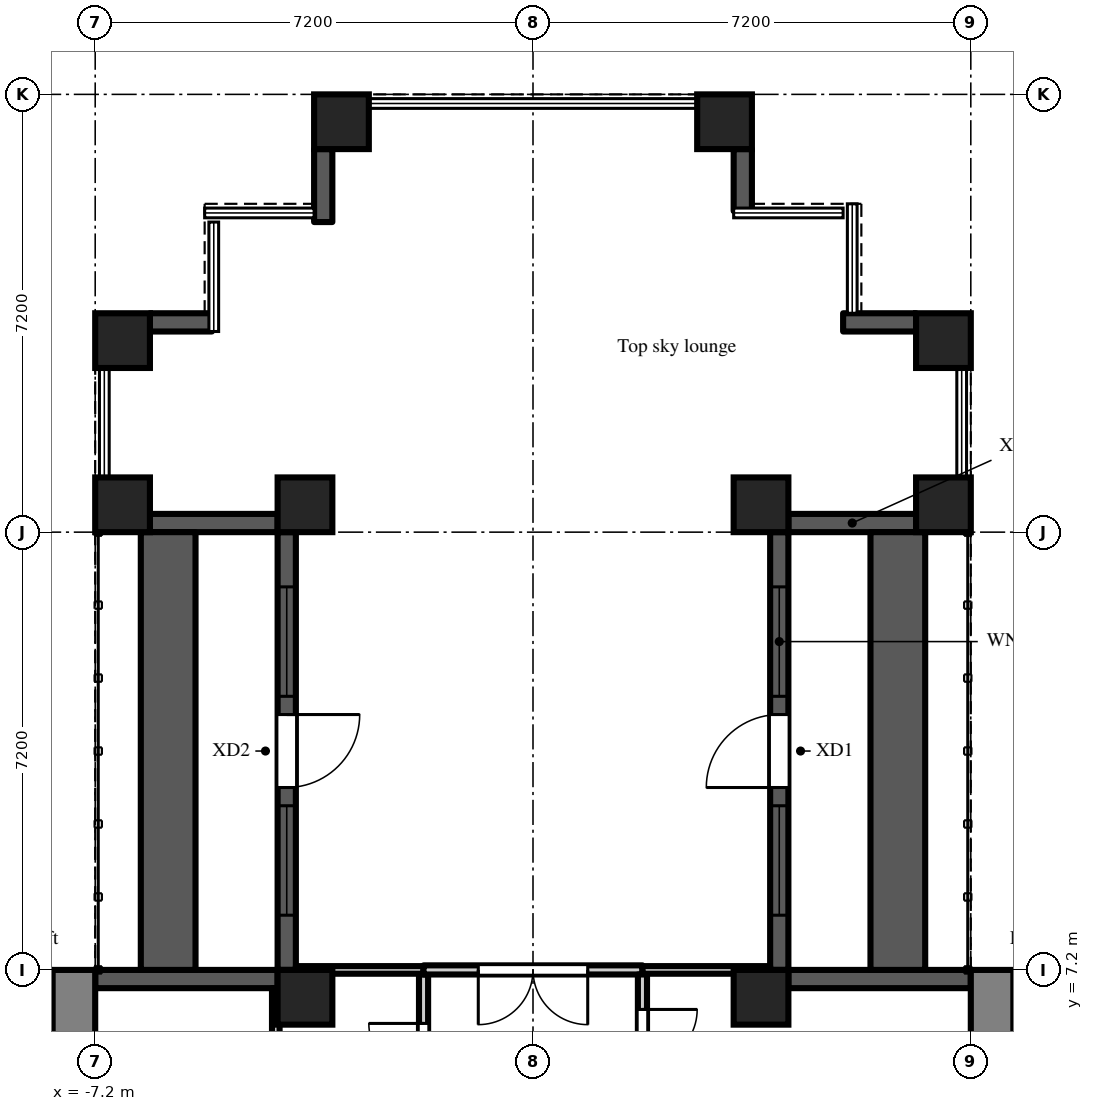
"""IFC4 building model, lengths in metres.
Left out: names, types, materials, properties, quantities, classifications, styles, units other than length and angle.
Written with IfcOpenShell. Run it as: python <this file> out.ifc"""

import sys

from ifc_helpers import new_model, si_unit, direction, frame, frame_2d, origin, origin_2d, place, context, subcontext, project, spatial, rectangle, extrude, element, fill, save


model = new_model("IFC4")
c1 = context("Model", 3, precision=1e-05, world=origin(), true_north=direction((0.0, 1.0)))
c2 = subcontext(c1, "Body", "Model", "MODEL_VIEW")
j1 = project(units=[si_unit("LENGTHUNIT", "METRE"), si_unit("PLANEANGLEUNIT", "RADIAN")], contexts=[c1])
p1 = place(None, origin())
s1 = spatial("IfcSite", under=j1, at=p1, CompositionType="ELEMENT")
p2 = place(p1, origin())
s2 = spatial("IfcBuilding", under=s1, at=p2, CompositionType="ELEMENT")
p3 = place(p2, frame((0.0, 0.0, 237.9)))
s3 = spatial("IfcBuildingStorey", under=s2, at=p3, CompositionType="ELEMENT", Elevation=237.9)
for number, where, z_axis, x_axis in (
    (1, (-6.75, 14.85, 0.0), (0.0, 0.0, 1.0), (1.0, 0.0, 0.0)),
    (2, (-6.75, 17.55, 0.0), (0.0, 0.0, 1.0), (1.0, 0.0, 0.0)),
    (3, (-3.75, 6.75, 0.0), (0.0, 0.0, 1.0), (1.0, 0.0, 0.0)),
    (4, (-3.75, 14.85, 0.0), (0.0, 0.0, 1.0), (1.0, 0.0, 0.0)),
    (5, (-3.15, 21.15, 0.0), (0.0, 0.0, 1.0), (1.0, 0.0, 0.0)),
    (6, (3.15, 21.15, 0.0), (0.0, 0.0, 1.0), (1.0, 0.0, 0.0)),
    (7, (3.75, 6.75, 0.0), (0.0, 0.0, 1.0), (1.0, 0.0, 0.0)),
    (8, (3.75, 14.85, 0.0), (0.0, 0.0, 1.0), (1.0, 0.0, 0.0)),
    (9, (6.75, 14.85, 0.0), (0.0, 0.0, 1.0), (1.0, 0.0, 0.0)),
    (10, (6.75, 17.55, 0.0), (0.0, 0.0, 1.0), (1.0, 0.0, 0.0)),
):
    element("IfcColumn", number, at=place(p3, frame(where, z_axis=z_axis, x_axis=x_axis)), inside=s3, PredefinedType="COLUMN", context=c2, shape_type="SweptSolid", body=[
        extrude(rectangle(XDim=0.9, YDim=0.9, at=origin_2d()), origin(), (0.0, 0.0, 1.0), 4.2),
    ])
p4 = place(p3, frame((7.2, 7.05, 0.0), z_axis=(0.0, 0.0, 1.0), x_axis=(-1.0, 0.0, 0.0)))
e11 = element("IfcWall", 11, at=p4, inside=s3, PredefinedType="SOLIDWALL", context=c2, shape_type="SweptSolid", body=[
    extrude(rectangle(XDim=3.0, YDim=0.3, at=frame_2d((1.5, 0.0))), origin(), (0.0, 0.0, 1.0), 3.75),
])
p5 = place(p3, frame((4.05, 7.2, 0.0), z_axis=(0.0, 0.0, 1.0), x_axis=(0.0, 1.0, 0.0)))
e12 = element("IfcWall", 12, at=p5, inside=s3, PredefinedType="SOLIDWALL", context=c2, shape_type="SweptSolid", body=[
    extrude(rectangle(XDim=7.2, YDim=0.3, at=frame_2d((3.6, 0.0))), origin(), (0.0, 0.0, 1.0), 3.75),
])
p6 = place(p5, frame((3.0, 0.0, 0.0)))
e13 = element("IfcOpeningElement", 13, at=p6, cuts=e12, PredefinedType="OPENING", context=c2, shape_type="SweptSolid", body=[
    extrude(rectangle(XDim=1.2, YDim=2.05, at=frame_2d((0.6, 1.025))), frame((0.0, 0.16, 0.0), z_axis=(0.0, -1.0, 0.0), x_axis=(1.0, 0.0, 0.0)), (0.0, 0.0, 1.0), 0.32),
])
p7 = place(p5, frame((0.9, 0.0, 0.2)))
e14 = element("IfcOpeningElement", 14, at=p7, cuts=e12, PredefinedType="OPENING", context=c2, shape_type="SweptSolid", body=[
    extrude(rectangle(XDim=1.8, YDim=1.85, at=frame_2d((0.9, 0.925))), frame((0.0, 0.16, 0.0), z_axis=(0.0, -1.0, 0.0), x_axis=(1.0, 0.0, 0.0)), (0.0, 0.0, 1.0), 0.32),
])
p8 = place(p5, frame((4.5, 0.0, 0.2)))
e15 = element("IfcOpeningElement", 15, at=p8, cuts=e12, PredefinedType="OPENING", context=c2, shape_type="SweptSolid", body=[
    extrude(rectangle(XDim=1.8, YDim=1.85, at=frame_2d((0.9, 0.925))), frame((0.0, 0.16, 0.0), z_axis=(0.0, -1.0, 0.0), x_axis=(1.0, 0.0, 0.0)), (0.0, 0.0, 1.0), 0.32),
])
p9 = place(p3, frame((4.2, 14.55, 0.0), z_axis=(0.0, 0.0, 1.0), x_axis=(1.0, 0.0, 0.0)))
e16 = element("IfcWall", 16, at=p9, inside=s3, PredefinedType="SOLIDWALL", context=c2, shape_type="SweptSolid", body=[
    extrude(rectangle(XDim=2.1, YDim=0.3, at=frame_2d((1.05, 0.0))), origin(), (0.0, 0.0, 1.0), 3.75),
])
p10 = place(p3, frame((6.3, 17.85, 0.0), z_axis=(0.0, 0.0, 1.0), x_axis=(-1.0, 0.0, 0.0)))
e17 = element("IfcWall", 17, at=p10, inside=s3, PredefinedType="SOLIDWALL", context=c2, shape_type="SweptSolid", body=[
    extrude(rectangle(XDim=1.2, YDim=0.3, at=frame_2d((0.6, 0.0))), origin(), (0.0, 0.0, 1.0), 3.75),
])
p11 = place(p3, frame((3.45, 19.68, 0.0), z_axis=(0.0, 0.0, 1.0), x_axis=(0.0, 1.0, 0.0)))
e18 = element("IfcWall", 18, at=p11, inside=s3, PredefinedType="SOLIDWALL", context=c2, shape_type="SweptSolid", body=[
    extrude(rectangle(XDim=1.02, YDim=0.3, at=frame_2d((0.51, 0.0))), origin(), (0.0, 0.0, 1.0), 3.75),
])
p12 = place(p3, frame((-3.45, 20.7, 0.0), z_axis=(0.0, 0.0, 1.0), x_axis=(0.0, -1.0, 0.0)))
e19 = element("IfcWall", 19, at=p12, inside=s3, PredefinedType="SOLIDWALL", context=c2, shape_type="SweptSolid", body=[
    extrude(rectangle(XDim=1.2, YDim=0.3, at=frame_2d((0.6, 0.0))), origin(), (0.0, 0.0, 1.0), 3.75),
])
p13 = place(p3, frame((-5.28, 17.85, 0.0), z_axis=(0.0, 0.0, 1.0), x_axis=(-1.0, 0.0, 0.0)))
e20 = element("IfcWall", 20, at=p13, inside=s3, PredefinedType="SOLIDWALL", context=c2, shape_type="SweptSolid", body=[
    extrude(rectangle(XDim=1.02, YDim=0.3, at=frame_2d((0.51, 0.0))), origin(), (0.0, 0.0, 1.0), 3.75),
])
p14 = place(p3, frame((-6.3, 14.55, 0.0), z_axis=(0.0, 0.0, 1.0), x_axis=(1.0, 0.0, 0.0)))
e21 = element("IfcWall", 21, at=p14, inside=s3, PredefinedType="SOLIDWALL", context=c2, shape_type="SweptSolid", body=[
    extrude(rectangle(XDim=2.1, YDim=0.3, at=frame_2d((1.05, 0.0))), origin(), (0.0, 0.0, 1.0), 3.75),
])
p15 = place(p3, frame((-4.05, 14.4, 0.0), z_axis=(0.0, 0.0, 1.0), x_axis=(0.0, -1.0, 0.0)))
e22 = element("IfcWall", 22, at=p15, inside=s3, PredefinedType="SOLIDWALL", context=c2, shape_type="SweptSolid", body=[
    extrude(rectangle(XDim=7.2, YDim=0.3, at=frame_2d((3.6, 0.0))), origin(), (0.0, 0.0, 1.0), 3.75),
])
p16 = place(p15, frame((3.0, 0.0, 0.0)))
e23 = element("IfcOpeningElement", 23, at=p16, cuts=e22, PredefinedType="OPENING", context=c2, shape_type="SweptSolid", body=[
    extrude(rectangle(XDim=1.2, YDim=2.05, at=frame_2d((0.6, 1.025))), frame((0.0, 0.16, 0.0), z_axis=(0.0, -1.0, 0.0), x_axis=(1.0, 0.0, 0.0)), (0.0, 0.0, 1.0), 0.32),
])
p17 = place(p15, frame((0.9, 0.0, 0.2)))
e24 = element("IfcOpeningElement", 24, at=p17, cuts=e22, PredefinedType="OPENING", context=c2, shape_type="SweptSolid", body=[
    extrude(rectangle(XDim=1.8, YDim=1.85, at=frame_2d((0.9, 0.925))), frame((0.0, 0.16, 0.0), z_axis=(0.0, -1.0, 0.0), x_axis=(1.0, 0.0, 0.0)), (0.0, 0.0, 1.0), 0.32),
])
p18 = place(p15, frame((4.5, 0.0, 0.2)))
e25 = element("IfcOpeningElement", 25, at=p18, cuts=e22, PredefinedType="OPENING", context=c2, shape_type="SweptSolid", body=[
    extrude(rectangle(XDim=1.8, YDim=1.85, at=frame_2d((0.9, 0.925))), frame((0.0, 0.16, 0.0), z_axis=(0.0, -1.0, 0.0), x_axis=(1.0, 0.0, 0.0)), (0.0, 0.0, 1.0), 0.32),
])
p19 = place(p3, frame((-4.2, 7.05, 0.0), z_axis=(0.0, 0.0, 1.0), x_axis=(-1.0, 0.0, 0.0)))
e26 = element("IfcWall", 26, at=p19, inside=s3, PredefinedType="SOLIDWALL", context=c2, shape_type="SweptSolid", body=[
    extrude(rectangle(XDim=3.0, YDim=0.3, at=frame_2d((1.5, 0.0))), origin(), (0.0, 0.0, 1.0), 3.75),
])
for number, where, z_axis, x_axis in (
    (27, (6.0, 7.2, 0.0), (0.0, 0.0, 1.0), (0.0, 1.0, 0.0)),
    (28, (-6.0, 7.2, 0.0), (0.0, 0.0, 1.0), (0.0, 1.0, 0.0)),
):
    element("IfcWall", number, at=place(p3, frame(where, z_axis=z_axis, x_axis=x_axis)), inside=s3, PredefinedType="PARAPET", context=c2, shape_type="SweptSolid", body=[
        extrude(rectangle(XDim=7.2, YDim=0.9, at=frame_2d((3.6, 0.0))), origin(), (0.0, 0.0, 1.0), 0.8),
    ])
p20 = place(p3, frame((7.55, -7.2, 0.0), z_axis=(0.0, 0.0, 1.0), x_axis=(0.0, 1.0, 0.0)))
e29 = element("IfcWall", 29, at=p20, inside=s3, PredefinedType="SHEAR", context=c2, shape_type="SweptSolid", body=[
    extrude(rectangle(XDim=14.4, YDim=0.7, at=frame_2d((7.2, 0.0))), origin(), (0.0, 0.0, 1.0), 3.75),
])
p21 = place(p20, frame((6.0, 0.0, 0.0)))
e30 = element("IfcOpeningElement", 30, at=p21, cuts=e29, PredefinedType="OPENING", context=c2, shape_type="SweptSolid", body=[
    extrude(rectangle(XDim=2.4, YDim=2.2, at=frame_2d((1.2, 1.1))), frame((0.0, 0.36, 0.0), z_axis=(0.0, -1.0, 0.0), x_axis=(1.0, 0.0, 0.0)), (0.0, 0.0, 1.0), 0.72),
])
p22 = place(p3, frame((-7.55, -7.2, 0.0), z_axis=(0.0, 0.0, 1.0), x_axis=(0.0, 1.0, 0.0)))
e31 = element("IfcWall", 31, at=p22, inside=s3, PredefinedType="SHEAR", context=c2, shape_type="SweptSolid", body=[
    extrude(rectangle(XDim=14.4, YDim=0.7, at=frame_2d((7.2, 0.0))), origin(), (0.0, 0.0, 1.0), 3.75),
])
p23 = place(p22, frame((6.0, 0.0, 0.0)))
e32 = element("IfcOpeningElement", 32, at=p23, cuts=e31, PredefinedType="OPENING", context=c2, shape_type="SweptSolid", body=[
    extrude(rectangle(XDim=2.4, YDim=2.2, at=frame_2d((1.2, 1.1))), frame((0.0, 0.36, 0.0), z_axis=(0.0, -1.0, 0.0), x_axis=(1.0, 0.0, 0.0)), (0.0, 0.0, 1.0), 0.72),
])
p24 = place(p3, frame((-4.23, 1.875, 0.0), z_axis=(0.0, 0.0, 1.0), x_axis=(0.0, 1.0, 0.0)))
e33 = element("IfcWall", 33, at=p24, inside=s3, PredefinedType="PARTITIONING", context=c2, shape_type="SweptSolid", body=[
    extrude(rectangle(XDim=5.025, YDim=0.125, at=frame_2d((2.512, 0.0))), origin(), (0.0, 0.0, 1.0), 3.75),
])
p25 = place(p3, frame((-3.9, 7.2, 0.0), z_axis=(0.0, 0.0, 1.0), x_axis=(1.0, 0.0, 0.0)))
e34 = element("IfcWall", 34, at=p25, inside=s3, PredefinedType="PARTITIONING", context=c2, shape_type="SweptSolid", body=[
    extrude(rectangle(XDim=2.1, YDim=0.125, at=frame_2d((1.05, 0.0))), origin(), (0.0, 0.0, 1.0), 3.75),
])
p26 = place(p3, frame((-1.8, 1.725, 0.0), z_axis=(0.0, 0.0, 1.0), x_axis=(0.0, 1.0, 0.0)))
e35 = element("IfcWall", 35, at=p26, inside=s3, PredefinedType="PARTITIONING", context=c2, shape_type="SweptSolid", body=[
    extrude(rectangle(XDim=5.4, YDim=0.15, at=frame_2d((2.7, 0.0))), origin(), (0.0, 0.0, 1.0), 3.75),
])
p27 = place(p26, frame((1.11, 0.0, 0.0)))
e36 = element("IfcOpeningElement", 36, at=p27, cuts=e35, PredefinedType="OPENING", context=c2, shape_type="SweptSolid", body=[
    extrude(rectangle(XDim=0.9, YDim=2.1, at=frame_2d((0.45, 1.05))), frame((0.0, 0.085, 0.0), z_axis=(0.0, -1.0, 0.0), x_axis=(1.0, 0.0, 0.0)), (0.0, 0.0, 1.0), 0.17),
])
p28 = place(p26, frame((3.695, 0.0, 0.0)))
e37 = element("IfcOpeningElement", 37, at=p28, cuts=e35, PredefinedType="OPENING", context=c2, shape_type="SweptSolid", body=[
    extrude(rectangle(XDim=0.9, YDim=2.1, at=frame_2d((0.45, 1.05))), frame((0.0, 0.085, 0.0), z_axis=(0.0, -1.0, 0.0), x_axis=(1.0, 0.0, 0.0)), (0.0, 0.0, 1.0), 0.17),
])
p29 = place(p3, frame((-1.8, 7.2, 0.0), z_axis=(0.0, 0.0, 1.0), x_axis=(1.0, 0.0, 0.0)))
e38 = element("IfcWall", 38, at=p29, inside=s3, PredefinedType="PARTITIONING", context=c2, shape_type="SweptSolid", body=[
    extrude(rectangle(XDim=3.6, YDim=0.15, at=frame_2d((1.8, 0.0))), origin(), (0.0, 0.0, 1.0), 3.75),
])
p30 = place(p29, frame((0.9, 0.0, 0.0)))
e39 = element("IfcOpeningElement", 39, at=p30, cuts=e38, PredefinedType="OPENING", context=c2, shape_type="SweptSolid", body=[
    extrude(rectangle(XDim=1.8, YDim=2.1, at=frame_2d((0.9, 1.05))), frame((0.0, 0.085, 0.0), z_axis=(0.0, -1.0, 0.0), x_axis=(1.0, 0.0, 0.0)), (0.0, 0.0, 1.0), 0.17),
])
p31 = place(p3, frame((1.8, 1.725, 0.0), z_axis=(0.0, 0.0, 1.0), x_axis=(0.0, 1.0, 0.0)))
e40 = element("IfcWall", 40, at=p31, inside=s3, PredefinedType="PARTITIONING", context=c2, shape_type="SweptSolid", body=[
    extrude(rectangle(XDim=5.4, YDim=0.15, at=frame_2d((2.7, 0.0))), origin(), (0.0, 0.0, 1.0), 3.75),
])
p32 = place(p31, frame((0.175, 0.0, 0.0)))
e41 = element("IfcOpeningElement", 41, at=p32, cuts=e40, PredefinedType="OPENING", context=c2, shape_type="SweptSolid", body=[
    extrude(rectangle(XDim=0.9, YDim=2.1, at=frame_2d((0.45, 1.05))), frame((0.0, 0.085, 0.0), z_axis=(0.0, -1.0, 0.0), x_axis=(1.0, 0.0, 0.0)), (0.0, 0.0, 1.0), 0.17),
])
p33 = place(p31, frame((3.925, 0.0, 0.0)))
e42 = element("IfcOpeningElement", 42, at=p33, cuts=e40, PredefinedType="OPENING", context=c2, shape_type="SweptSolid", body=[
    extrude(rectangle(XDim=0.9, YDim=2.1, at=frame_2d((0.45, 1.05))), frame((0.0, 0.085, 0.0), z_axis=(0.0, -1.0, 0.0), x_axis=(1.0, 0.0, 0.0)), (0.0, 0.0, 1.0), 0.17),
])
p34 = place(p3, frame((1.8, 7.2, 0.0), z_axis=(0.0, 0.0, 1.0), x_axis=(1.0, 0.0, 0.0)))
e43 = element("IfcWall", 43, at=p34, inside=s3, PredefinedType="PARTITIONING", context=c2, shape_type="SweptSolid", body=[
    extrude(rectangle(XDim=2.1, YDim=0.125, at=frame_2d((1.05, 0.0))), origin(), (0.0, 0.0, 1.0), 3.75),
])
p35 = place(p6, origin())
e44 = element("IfcDoor", 44, at=p35, inside=s3, OperationType="SINGLE_SWING_LEFT", PredefinedType="DOOR", context=c2, shape_type="SweptSolid", body=[
    extrude(rectangle(XDim=1.2, YDim=2.05, at=frame_2d((0.6, 1.025))), frame((0.0, 0.025, 0.0), z_axis=(0.0, -1.0, 0.0), x_axis=(1.0, 0.0, 0.0)), (0.0, 0.0, 1.0), 0.05),
])
fill(e13, e44)
p36 = place(p7, origin())
e45 = element("IfcWindow", 45, at=p36, inside=s3, PartitioningType="SINGLE_PANEL", PredefinedType="WINDOW", context=c2, shape_type="SweptSolid", body=[
    extrude(rectangle(XDim=1.8, YDim=1.85, at=frame_2d((0.9, 0.925))), frame((0.0, 0.03, 0.0), z_axis=(0.0, -1.0, 0.0), x_axis=(1.0, 0.0, 0.0)), (0.0, 0.0, 1.0), 0.06),
])
fill(e14, e45)
p37 = place(p8, origin())
e46 = element("IfcWindow", 46, at=p37, inside=s3, PartitioningType="SINGLE_PANEL", PredefinedType="WINDOW", context=c2, shape_type="SweptSolid", body=[
    extrude(rectangle(XDim=1.8, YDim=1.85, at=frame_2d((0.9, 0.925))), frame((0.0, 0.03, 0.0), z_axis=(0.0, -1.0, 0.0), x_axis=(1.0, 0.0, 0.0)), (0.0, 0.0, 1.0), 0.06),
])
fill(e15, e46)
p38 = place(p16, origin())
e47 = element("IfcDoor", 47, at=p38, inside=s3, OperationType="SINGLE_SWING_LEFT", PredefinedType="DOOR", context=c2, shape_type="SweptSolid", body=[
    extrude(rectangle(XDim=1.2, YDim=2.05, at=frame_2d((0.6, 1.025))), frame((0.0, 0.025, 0.0), z_axis=(0.0, -1.0, 0.0), x_axis=(1.0, 0.0, 0.0)), (0.0, 0.0, 1.0), 0.05),
])
fill(e23, e47)
p39 = place(p17, origin())
e48 = element("IfcWindow", 48, at=p39, inside=s3, PartitioningType="SINGLE_PANEL", PredefinedType="WINDOW", context=c2, shape_type="SweptSolid", body=[
    extrude(rectangle(XDim=1.8, YDim=1.85, at=frame_2d((0.9, 0.925))), frame((0.0, 0.03, 0.0), z_axis=(0.0, -1.0, 0.0), x_axis=(1.0, 0.0, 0.0)), (0.0, 0.0, 1.0), 0.06),
])
fill(e24, e48)
p40 = place(p18, origin())
e49 = element("IfcWindow", 49, at=p40, inside=s3, PartitioningType="SINGLE_PANEL", PredefinedType="WINDOW", context=c2, shape_type="SweptSolid", body=[
    extrude(rectangle(XDim=1.8, YDim=1.85, at=frame_2d((0.9, 0.925))), frame((0.0, 0.03, 0.0), z_axis=(0.0, -1.0, 0.0), x_axis=(1.0, 0.0, 0.0)), (0.0, 0.0, 1.0), 0.06),
])
fill(e25, e49)
p41 = place(p33, frame((0.9, 0.0, 0.0), z_axis=(0.0, 0.0, 1.0), x_axis=(-1.0, 0.0, 0.0)))
e50 = element("IfcDoor", 50, at=p41, inside=s3, OperationType="SINGLE_SWING_LEFT", PredefinedType="DOOR", context=c2, shape_type="SweptSolid", body=[
    extrude(rectangle(XDim=0.9, YDim=2.1, at=frame_2d((0.45, 1.05))), frame((0.0, 0.025, 0.0), z_axis=(0.0, -1.0, 0.0), x_axis=(1.0, 0.0, 0.0)), (0.0, 0.0, 1.0), 0.05),
])
fill(e42, e50)
p42 = place(p28, origin())
e51 = element("IfcDoor", 51, at=p42, inside=s3, OperationType="SINGLE_SWING_RIGHT", PredefinedType="DOOR", context=c2, shape_type="SweptSolid", body=[
    extrude(rectangle(XDim=0.9, YDim=2.1, at=frame_2d((0.45, 1.05))), frame((0.0, 0.025, 0.0), z_axis=(0.0, -1.0, 0.0), x_axis=(1.0, 0.0, 0.0)), (0.0, 0.0, 1.0), 0.05),
])
fill(e37, e51)
p43 = place(p30, frame((1.8, 0.0, 0.0), z_axis=(0.0, 0.0, 1.0), x_axis=(-1.0, 0.0, 0.0)))
e52 = element("IfcDoor", 52, at=p43, inside=s3, OperationType="DOUBLE_DOOR_DOUBLE_SWING", PredefinedType="DOOR", context=c2, shape_type="SweptSolid", body=[
    extrude(rectangle(XDim=1.8, YDim=2.1, at=frame_2d((0.9, 1.05))), frame((0.0, 0.025, 0.0), z_axis=(0.0, -1.0, 0.0), x_axis=(1.0, 0.0, 0.0)), (0.0, 0.0, 1.0), 0.05),
])
fill(e39, e52)
save(model, sys.argv[1])
